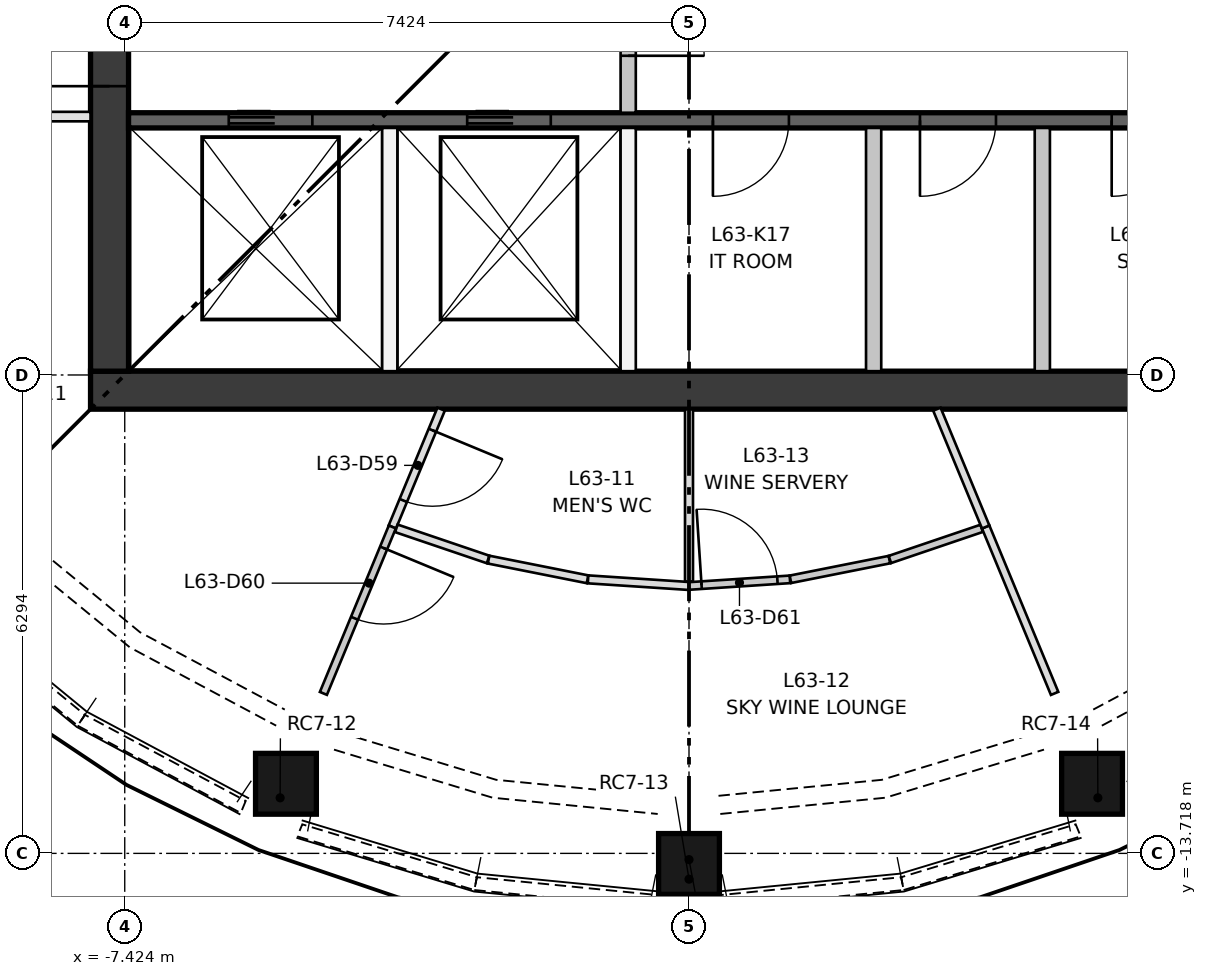
"""IFC4 building model, lengths in metres.
Left out: names, types, materials, properties, quantities, classifications, styles, units other than length and angle.
Written with IfcOpenShell. Run it as: python <this file> out.ifc"""

import sys

from ifc_helpers import new_model, si_unit, direction, frame, frame_2d, origin, origin_2d, place, context, subcontext, project, spatial, polyline, rectangle, outline, extrude, element, fill, save


model = new_model("IFC4")
c1 = context("Model", 3, precision=1e-05, world=origin(), true_north=direction((0.0, 1.0)))
c2 = subcontext(c1, "Body", "Model", "MODEL_VIEW")
j1 = project(units=[si_unit("LENGTHUNIT", "METRE"), si_unit("PLANEANGLEUNIT", "RADIAN")], contexts=[c1])
p1 = place(None, origin())
s1 = spatial("IfcSite", under=j1, at=p1, CompositionType="ELEMENT")
p2 = place(p1, origin())
s2 = spatial("IfcBuilding", under=s1, at=p2, CompositionType="ELEMENT")
p3 = place(p2, frame((0.0, 0.0, 231.2)))
s3 = spatial("IfcBuildingStorey", under=s2, at=p3, CompositionType="ELEMENT", Elevation=231.2)
p4 = place(p3, frame((-5.379, -12.987, 0.5), z_axis=(0.0, 0.0, 1.0), x_axis=(-0.923896423382, 0.382642651649, 0.0)))
e1 = element("IfcColumn", 1, at=p4, inside=s3, PredefinedType="COLUMN", context=c2, shape_type="SweptSolid", body=[
    extrude(rectangle(XDim=0.8, YDim=0.8, at=origin_2d()), origin(), (0.0, -0.275, 0.962), 3.328),
])
p5 = place(p3, frame((0.0, -14.057, 0.5), z_axis=(0.0, 0.0, 1.0), x_axis=(-1.0, 0.0, 0.0)))
e2 = element("IfcColumn", 2, at=p5, inside=s3, PredefinedType="COLUMN", context=c2, shape_type="SweptSolid", body=[
    extrude(rectangle(XDim=0.8, YDim=0.8, at=origin_2d()), origin(), (0.0, -0.275, 0.962), 3.328),
])
p6 = place(p3, frame((5.379, -12.987, 0.5), z_axis=(0.0, 0.0, 1.0), x_axis=(-0.923896423382, -0.382642651649, 0.0)))
e3 = element("IfcColumn", 3, at=p6, inside=s3, PredefinedType="COLUMN", context=c2, shape_type="SweptSolid", body=[
    extrude(rectangle(XDim=0.8, YDim=0.8, at=origin_2d()), origin(), (0.0, -0.275, 0.962), 3.328),
])
p7 = place(p3, frame((-7.874, -7.624, 0.0), z_axis=(0.0, 0.0, 1.0), x_axis=(1.0, 0.0, 0.0)))
e4 = element("IfcWall", 4, at=p7, inside=s3, PredefinedType="SHEAR", context=c2, shape_type="SweptSolid", body=[
    extrude(rectangle(XDim=15.748, YDim=0.5, at=frame_2d((7.874, 0.0))), origin(), (0.0, 0.0, 1.0), 3.3),
])
p8 = place(p3, frame((-7.624, -7.374, 0.0), z_axis=(0.0, 0.0, 1.0), x_axis=(0.0, 1.0, 0.0)))
e5 = element("IfcWall", 5, at=p8, inside=s3, PredefinedType="SHEAR", context=c2, shape_type="SweptSolid", body=[
    extrude(rectangle(XDim=14.748, YDim=0.5, at=frame_2d((7.374, 0.0))), origin(), (0.0, 0.0, 1.0), 3.3),
])
p9 = place(p8, frame((6.874, 0.0, 0.0)))
e6 = element("IfcOpeningElement", 6, at=p9, cuts=e5, PredefinedType="OPENING", context=c2, shape_type="SweptSolid", body=[
    extrude(rectangle(XDim=1.0, YDim=2.1, at=frame_2d((0.5, 1.05))), frame((0.0, 0.26, 0.0), z_axis=(0.0, -1.0, 0.0), x_axis=(1.0, 0.0, 0.0)), (0.0, 0.0, 1.0), 0.52),
])
p10 = place(p8, frame((3.75, 0.0, 0.0)))
e7 = element("IfcOpeningElement", 7, at=p10, cuts=e5, PredefinedType="OPENING", context=c2, shape_type="SweptSolid", body=[
    extrude(rectangle(XDim=1.8, YDim=2.1, at=frame_2d((0.9, 1.05))), frame((0.0, 0.26, 0.0), z_axis=(0.0, -1.0, 0.0), x_axis=(1.0, 0.0, 0.0)), (0.0, 0.0, 1.0), 0.52),
])
p11 = place(p8, frame((9.198, 0.0, 0.0)))
e8 = element("IfcOpeningElement", 8, at=p11, cuts=e5, PredefinedType="OPENING", context=c2, shape_type="SweptSolid", body=[
    extrude(rectangle(XDim=1.8, YDim=2.1, at=frame_2d((0.9, 1.05))), frame((0.0, 0.26, 0.0), z_axis=(0.0, -1.0, 0.0), x_axis=(1.0, 0.0, 0.0)), (0.0, 0.0, 1.0), 0.52),
])
p12 = place(p3, frame((-7.374, -4.074, 0.0), z_axis=(0.0, 0.0, 1.0), x_axis=(1.0, 0.0, 0.0)))
e9 = element("IfcWall", 9, at=p12, inside=s3, PredefinedType="SHEAR", context=c2, shape_type="SweptSolid", body=[
    extrude(rectangle(XDim=14.748, YDim=0.2, at=frame_2d((7.374, 0.0))), origin(), (0.0, 0.0, 1.0), 3.3),
])
p13 = place(p12, frame((1.319, 0.0, 0.0)))
e10 = element("IfcOpeningElement", 10, at=p13, cuts=e9, PredefinedType="OPENING", context=c2, shape_type="SweptSolid", body=[
    extrude(rectangle(XDim=1.1, YDim=2.1, at=frame_2d((0.55, 1.05))), frame((0.0, 0.11, 0.0), z_axis=(0.0, -1.0, 0.0), x_axis=(1.0, 0.0, 0.0)), (0.0, 0.0, 1.0), 0.22),
])
p14 = place(p12, frame((4.456, 0.0, 0.0)))
e11 = element("IfcOpeningElement", 11, at=p14, cuts=e9, PredefinedType="OPENING", context=c2, shape_type="SweptSolid", body=[
    extrude(rectangle(XDim=1.1, YDim=2.1, at=frame_2d((0.55, 1.05))), frame((0.0, 0.11, 0.0), z_axis=(0.0, -1.0, 0.0), x_axis=(1.0, 0.0, 0.0)), (0.0, 0.0, 1.0), 0.22),
])
p15 = place(p12, frame((7.689, 0.0, 0.0)))
e12 = element("IfcOpeningElement", 12, at=p15, cuts=e9, PredefinedType="OPENING", context=c2, shape_type="SweptSolid", body=[
    extrude(rectangle(XDim=1.0, YDim=2.1, at=frame_2d((0.5, 1.05))), frame((0.0, 0.11, 0.0), z_axis=(0.0, -1.0, 0.0), x_axis=(1.0, 0.0, 0.0)), (0.0, 0.0, 1.0), 0.22),
])
p16 = place(p12, frame((10.413, 0.0, 0.0)))
e13 = element("IfcOpeningElement", 13, at=p16, cuts=e9, PredefinedType="OPENING", context=c2, shape_type="SweptSolid", body=[
    extrude(rectangle(XDim=1.0, YDim=2.1, at=frame_2d((0.5, 1.05))), frame((0.0, 0.11, 0.0), z_axis=(0.0, -1.0, 0.0), x_axis=(1.0, 0.0, 0.0)), (0.0, 0.0, 1.0), 0.22),
])
p17 = place(p12, frame((12.935, 0.0, 0.0)))
e14 = element("IfcOpeningElement", 14, at=p17, cuts=e9, PredefinedType="OPENING", context=c2, shape_type="SweptSolid", body=[
    extrude(rectangle(XDim=1.0, YDim=2.1, at=frame_2d((0.5, 1.05))), frame((0.0, 0.11, 0.0), z_axis=(0.0, -1.0, 0.0), x_axis=(1.0, 0.0, 0.0)), (0.0, 0.0, 1.0), 0.22),
])
for number, where, z_axis, x_axis in (
    (15, (-3.937, -7.374, 0.0), (0.0, 0.0, 1.0), (0.0, 1.0, 0.0)),
    (16, (-0.8, -7.374, 0.0), (0.0, 0.0, 1.0), (0.0, 1.0, 0.0)),
):
    element("IfcWall", number, at=place(p3, frame(where, z_axis=z_axis, x_axis=x_axis)), inside=s3, PredefinedType="PARTITIONING", context=c2, shape_type="SweptSolid", body=[
        extrude(rectangle(XDim=3.2, YDim=0.2, at=frame_2d((1.6, 0.0))), origin(), (0.0, 0.0, 1.0), 3.3),
    ])
p18 = place(p3, frame((-0.8, -3.974, 0.0), z_axis=(0.0, 0.0, 1.0), x_axis=(0.0, 1.0, 0.0)))
e17 = element("IfcWall", 17, at=p18, inside=s3, PredefinedType="PARTITIONING", context=c2, shape_type="SweptSolid", body=[
    extrude(rectangle(XDim=2.499, YDim=0.2, at=frame_2d((1.25, 0.0))), origin(), (0.0, 0.0, 1.0), 3.3),
])
p19 = place(p18, frame((0.75, 0.0, 0.0)))
e18 = element("IfcOpeningElement", 18, at=p19, cuts=e17, PredefinedType="OPENING", context=c2, shape_type="SweptSolid", body=[
    extrude(rectangle(XDim=1.0, YDim=2.1, at=frame_2d((0.5, 1.05))), frame((0.0, 0.11, 0.0), z_axis=(0.0, -1.0, 0.0), x_axis=(1.0, 0.0, 0.0)), (0.0, 0.0, 1.0), 0.22),
])
for number, where, z_axis, x_axis in (
    (19, (2.429, -7.374, 0.0), (0.0, 0.0, 1.0), (0.0, 1.0, 0.0)),
    (20, (4.649, -7.374, 0.0), (0.0, 0.0, 1.0), (0.0, 1.0, 0.0)),
):
    element("IfcWall", number, at=place(p3, frame(where, z_axis=z_axis, x_axis=x_axis)), inside=s3, PredefinedType="PARTITIONING", context=c2, shape_type="SweptSolid", body=[
        extrude(rectangle(XDim=3.2, YDim=0.2, at=frame_2d((1.6, 0.0))), origin(), (0.0, 0.0, 1.0), 3.3),
    ])
p20 = place(p3, frame((-9.926, -10.495, 0.0), z_axis=(-0.59284076781, -0.722862546463, 0.354978257002), x_axis=(0.773221096766, -0.634136527431, 9.701072e-06)))
e21 = element("IfcWall", 21, at=p20, inside=s3, PredefinedType="SOLIDWALL", context=c2, shape_type="SweptSolid", body=[
    extrude(outline(polyline([(0.0, 0.0), (2.434, -5.551e-17), (2.417, 0.481), (0.017, 0.481), (0.0, 0.0)])), origin(), (0.0, 0.0, -1.0), 0.3),
])
p21 = place(p3, frame((-8.044, -12.038, 0.0), z_axis=(-0.441126603603, -0.824402860411, 0.354636776631), x_axis=(0.881712517728, -0.471787066311, 1.195964e-05)))
e22 = element("IfcWall", 22, at=p21, inside=s3, PredefinedType="SOLIDWALL", context=c2, shape_type="SweptSolid", body=[
    extrude(outline(polyline([(0.0, 0.0), (2.434, 5.551e-17), (2.417, 0.481), (0.017, 0.481), (0.0, 0.0)])), origin(), (0.0, 0.0, -1.0), 0.3),
])
p22 = place(p3, frame((-5.154, -13.494, 0.0), z_axis=(-0.271094631402, -0.894631168658, 0.355165838574), x_axis=(0.957026634075, -0.290000037325, 4.815507e-06)))
e23 = element("IfcWall", 23, at=p22, inside=s3, PredefinedType="SOLIDWALL", context=c2, shape_type="SweptSolid", body=[
    extrude(outline(polyline([(0.0, 0.0), (2.434, 0.0), (2.417, 0.481), (0.017, 0.481), (0.0, 0.0)])), origin(), (0.0, 0.0, -1.0), 0.3),
])
p23 = place(p3, frame((-2.824, -14.2, 0.0), z_axis=(-0.091755306795, -0.93035064291, 0.355005133642), x_axis=(0.995172119915, -0.098145054237, 8.475565e-06)))
e24 = element("IfcWall", 24, at=p23, inside=s3, PredefinedType="SOLIDWALL", context=c2, shape_type="SweptSolid", body=[
    extrude(outline(polyline([(0.0, 0.0), (2.433, 1.388e-17), (2.417, 0.481), (0.017, 0.481), (0.0, 0.0)])), origin(), (0.0, 0.0, -1.0), 0.3),
])
p24 = place(p3, frame((0.403, -14.439, 0.0), z_axis=(0.091755306795, -0.93035064291, 0.355005133642), x_axis=(0.995172119915, 0.098145054237, -8.475565e-06)))
e25 = element("IfcWall", 25, at=p24, inside=s3, PredefinedType="SOLIDWALL", context=c2, shape_type="SweptSolid", body=[
    extrude(outline(polyline([(0.0, 0.0), (2.433, -1.388e-17), (2.417, 0.481), (0.017, 0.481), (0.0, 0.0)])), origin(), (0.0, 0.0, -1.0), 0.3),
])
p25 = place(p3, frame((2.824, -14.2, 0.0), z_axis=(0.271074750296, -0.894721380135, 0.354953703573), x_axis=(0.957038883806, 0.289959608839, 1.1226683e-05)))
e26 = element("IfcWall", 26, at=p25, inside=s3, PredefinedType="SOLIDWALL", context=c2, shape_type="SweptSolid", body=[
    extrude(outline(polyline([(0.0, 0.0), (2.434, -5.551e-17), (2.417, 0.481), (0.017, 0.481), (0.0, 0.0)])), origin(), (0.0, 0.0, -1.0), 0.3),
])
p26 = place(p3, frame((5.898, -13.186, 0.0), z_axis=(0.441016524886, -0.824332600798, 0.35493687895), x_axis=(0.881740708382, 0.471734377661, 1.0715603e-05)))
e27 = element("IfcWall", 27, at=p26, inside=s3, PredefinedType="SOLIDWALL", context=c2, shape_type="SweptSolid", body=[
    extrude(outline(polyline([(0.0, 0.0), (2.434, 0.0), (2.417, 0.481), (0.017, 0.481), (0.0, 0.0)])), origin(), (0.0, 0.0, -1.0), 0.3),
])
p27 = place(p3, frame((-7.874, -4.024, 0.0), z_axis=(0.0, 0.0, 1.0), x_axis=(-1.0, 0.0, 0.0)))
e28 = element("IfcWall", 28, at=p27, inside=s3, PredefinedType="PARTITIONING", context=c2, shape_type="SweptSolid", body=[
    extrude(rectangle(XDim=1.109, YDim=0.125, at=frame_2d((0.554, 0.0))), origin(), (0.0, 0.0, 1.0), 3.3),
])
p28 = place(p3, frame((-3.261, -7.874, 0.0), z_axis=(0.0, 0.0, 1.0), x_axis=(-0.382681757498, -0.923880226262, 0.0)))
e29 = element("IfcWall", 29, at=p28, inside=s3, PredefinedType="PARTITIONING", context=c2, shape_type="SweptSolid", body=[
    extrude(rectangle(XDim=1.677, YDim=0.105, at=frame_2d((0.839, 0.0))), origin(), (0.0, 0.0, 1.0), 3.3),
])
p29 = place(p28, frame((0.3, 0.0, 0.0)))
e30 = element("IfcOpeningElement", 30, at=p29, cuts=e29, PredefinedType="OPENING", context=c2, shape_type="SweptSolid", body=[
    extrude(rectangle(XDim=1.0, YDim=2.1, at=frame_2d((0.5, 1.05))), frame((0.0, 0.062, 0.0), z_axis=(0.0, -1.0, 0.0), x_axis=(1.0, 0.0, 0.0)), (0.0, 0.0, 1.0), 0.125),
])
p30 = place(p3, frame((-3.903, -9.424, 0.0), z_axis=(0.0, 0.0, 1.0), x_axis=(-0.382676271808, -0.923882498479, 0.0)))
e31 = element("IfcWall", 31, at=p30, inside=s3, PredefinedType="PARTITIONING", context=c2, shape_type="SweptSolid", body=[
    extrude(rectangle(XDim=2.37, YDim=0.1, at=frame_2d((1.185, 0.0))), origin(), (0.0, 0.0, 1.0), 3.3),
])
p31 = place(p30, frame((0.3, 0.0, 0.0)))
e32 = element("IfcOpeningElement", 32, at=p31, cuts=e31, PredefinedType="OPENING", context=c2, shape_type="SweptSolid", body=[
    extrude(rectangle(XDim=1.0, YDim=2.1, at=frame_2d((0.5, 1.05))), frame((0.0, 0.06, 0.0), z_axis=(0.0, -1.0, 0.0), x_axis=(1.0, 0.0, 0.0)), (0.0, 0.0, 1.0), 0.12),
])
p32 = place(p3, frame((-2.643, -9.851, 0.0), z_axis=(0.0, 0.0, 1.0), x_axis=(-0.946945394448, 0.321394492695, 0.0)))
e33 = element("IfcWall", 33, at=p32, inside=s3, PredefinedType="PARTITIONING", context=c2, shape_type="SweptSolid", body=[
    extrude(rectangle(XDim=1.275, YDim=0.105, at=frame_2d((0.637, 0.0))), origin(), (0.0, 0.0, 1.0), 3.3),
])
p33 = place(p3, frame((-1.335, -10.112, 0.0), z_axis=(0.0, 0.0, 1.0), x_axis=(-0.980778229799, 0.195125764451, 0.0)))
e34 = element("IfcWall", 34, at=p33, inside=s3, PredefinedType="PARTITIONING", context=c2, shape_type="SweptSolid", body=[
    extrude(rectangle(XDim=1.328, YDim=0.105, at=frame_2d((0.664, 0.0))), origin(), (0.0, 0.0, 1.0), 3.3),
])
p34 = place(p3, frame((0.0, -10.2, 0.0), z_axis=(0.0, 0.0, 1.0), x_axis=(-0.997852823211, 0.065496131253, 0.0)))
e35 = element("IfcWall", 35, at=p34, inside=s3, PredefinedType="PARTITIONING", context=c2, shape_type="SweptSolid", body=[
    extrude(rectangle(XDim=1.331, YDim=0.105, at=frame_2d((0.666, 0.0))), origin(), (0.0, 0.0, 1.0), 3.3),
])
p35 = place(p3, frame((0.0, -7.874, 0.0), z_axis=(0.0, 0.0, 1.0), x_axis=(0.0, -1.0, 0.0)))
e36 = element("IfcWall", 36, at=p35, inside=s3, PredefinedType="PARTITIONING", context=c2, shape_type="SweptSolid", body=[
    extrude(rectangle(XDim=2.27, YDim=0.105, at=frame_2d((1.135, 0.0))), origin(), (0.0, 0.0, 1.0), 3.3),
])
p36 = place(p3, frame((0.0, -10.2, 0.0), z_axis=(0.0, 0.0, 1.0), x_axis=(0.997853610003, 0.065484143156, 0.0)))
e37 = element("IfcWall", 37, at=p36, inside=s3, PredefinedType="PARTITIONING", context=c2, shape_type="SweptSolid", body=[
    extrude(rectangle(XDim=1.331, YDim=0.1, at=frame_2d((0.666, 0.0))), origin(), (0.0, 0.0, 1.0), 3.3),
])
p37 = place(p36, frame((0.166, 0.0, 0.0)))
e38 = element("IfcOpeningElement", 38, at=p37, cuts=e37, PredefinedType="OPENING", context=c2, shape_type="SweptSolid", body=[
    extrude(rectangle(XDim=1.0, YDim=2.1, at=frame_2d((0.5, 1.05))), frame((0.0, 0.06, 0.0), z_axis=(0.0, -1.0, 0.0), x_axis=(1.0, 0.0, 0.0)), (0.0, 0.0, 1.0), 0.12),
])
p38 = place(p3, frame((1.335, -10.112, 0.0), z_axis=(0.0, 0.0, 1.0), x_axis=(0.980778229799, 0.195125764451, 0.0)))
e39 = element("IfcWall", 39, at=p38, inside=s3, PredefinedType="PARTITIONING", context=c2, shape_type="SweptSolid", body=[
    extrude(rectangle(XDim=1.328, YDim=0.1, at=frame_2d((0.664, 0.0))), origin(), (0.0, 0.0, 1.0), 3.3),
])
p39 = place(p3, frame((2.643, -9.851, 0.0), z_axis=(0.0, 0.0, 1.0), x_axis=(0.946984941769, 0.321277948299, 0.0)))
e40 = element("IfcWall", 40, at=p39, inside=s3, PredefinedType="PARTITIONING", context=c2, shape_type="SweptSolid", body=[
    extrude(rectangle(XDim=1.275, YDim=0.1, at=frame_2d((0.638, 0.0))), origin(), (0.0, 0.0, 1.0), 3.3),
])
p40 = place(p3, frame((3.903, -9.424, 0.0), z_axis=(0.0, 0.0, 1.0), x_axis=(0.382676271808, -0.923882498479, 0.0)))
e41 = element("IfcWall", 41, at=p40, inside=s3, PredefinedType="PARTITIONING", context=c2, shape_type="SweptSolid", body=[
    extrude(rectangle(XDim=2.37, YDim=0.105, at=frame_2d((1.185, 0.0))), origin(), (0.0, 0.0, 1.0), 3.3),
])
p41 = place(p3, frame((3.261, -7.874, 0.0), z_axis=(0.0, 0.0, 1.0), x_axis=(0.382681757498, -0.923880226262, 0.0)))
e42 = element("IfcWall", 42, at=p41, inside=s3, PredefinedType="PARTITIONING", context=c2, shape_type="SweptSolid", body=[
    extrude(rectangle(XDim=1.677, YDim=0.105, at=frame_2d((0.839, 0.0))), origin(), (0.0, 0.0, 1.0), 3.3),
])
p42 = place(p13, origin())
e43 = element("IfcDoor", 43, at=p42, inside=s3, OperationType="DOUBLE_DOOR_SLIDING", PredefinedType="DOOR", context=c2, shape_type="SweptSolid", body=[
    extrude(rectangle(XDim=1.1, YDim=2.1, at=frame_2d((0.55, 1.05))), frame((0.0, 0.025, 0.0), z_axis=(0.0, -1.0, 0.0), x_axis=(1.0, 0.0, 0.0)), (0.0, 0.0, 1.0), 0.05),
])
fill(e10, e43)
p43 = place(p14, origin())
e44 = element("IfcDoor", 44, at=p43, inside=s3, OperationType="DOUBLE_DOOR_SLIDING", PredefinedType="DOOR", context=c2, shape_type="SweptSolid", body=[
    extrude(rectangle(XDim=1.1, YDim=2.1, at=frame_2d((0.55, 1.05))), frame((0.0, 0.025, 0.0), z_axis=(0.0, -1.0, 0.0), x_axis=(1.0, 0.0, 0.0)), (0.0, 0.0, 1.0), 0.05),
])
fill(e11, e44)
p44 = place(p19, frame((1.0, 0.0, 0.0), z_axis=(0.0, 0.0, 1.0), x_axis=(-1.0, 0.0, 0.0)))
e45 = element("IfcDoor", 45, at=p44, inside=s3, OperationType="SINGLE_SWING_LEFT", PredefinedType="DOOR", context=c2, shape_type="SweptSolid", body=[
    extrude(rectangle(XDim=1.0, YDim=2.1, at=frame_2d((0.5, 1.05))), frame((0.0, 0.025, 0.0), z_axis=(0.0, -1.0, 0.0), x_axis=(1.0, 0.0, 0.0)), (0.0, 0.0, 1.0), 0.05),
])
fill(e18, e45)
p45 = place(p15, frame((1.0, 0.0, 0.0), z_axis=(0.0, 0.0, 1.0), x_axis=(-1.0, 0.0, 0.0)))
e46 = element("IfcDoor", 46, at=p45, inside=s3, OperationType="SINGLE_SWING_LEFT", PredefinedType="DOOR", context=c2, shape_type="SweptSolid", body=[
    extrude(rectangle(XDim=1.0, YDim=2.1, at=frame_2d((0.5, 1.05))), frame((0.0, 0.025, 0.0), z_axis=(0.0, -1.0, 0.0), x_axis=(1.0, 0.0, 0.0)), (0.0, 0.0, 1.0), 0.05),
])
fill(e12, e46)
p46 = place(p16, frame((1.0, 0.0, 0.0), z_axis=(0.0, 0.0, 1.0), x_axis=(-1.0, 0.0, 0.0)))
e47 = element("IfcDoor", 47, at=p46, inside=s3, OperationType="SINGLE_SWING_LEFT", PredefinedType="DOOR", context=c2, shape_type="SweptSolid", body=[
    extrude(rectangle(XDim=1.0, YDim=2.1, at=frame_2d((0.5, 1.05))), frame((0.0, 0.025, 0.0), z_axis=(0.0, -1.0, 0.0), x_axis=(1.0, 0.0, 0.0)), (0.0, 0.0, 1.0), 0.05),
])
fill(e13, e47)
p47 = place(p17, frame((1.0, 0.0, 0.0), z_axis=(0.0, 0.0, 1.0), x_axis=(-1.0, 0.0, 0.0)))
e48 = element("IfcDoor", 48, at=p47, inside=s3, OperationType="SINGLE_SWING_LEFT", PredefinedType="DOOR", context=c2, shape_type="SweptSolid", body=[
    extrude(rectangle(XDim=1.0, YDim=2.1, at=frame_2d((0.5, 1.05))), frame((0.0, 0.025, 0.0), z_axis=(0.0, -1.0, 0.0), x_axis=(1.0, 0.0, 0.0)), (0.0, 0.0, 1.0), 0.05),
])
fill(e14, e48)
p48 = place(p10, origin())
e49 = element("IfcDoor", 49, at=p48, inside=s3, OperationType="DOUBLE_DOOR_SINGLE_SWING", PredefinedType="DOOR", context=c2, shape_type="SweptSolid", body=[
    extrude(rectangle(XDim=1.8, YDim=2.1, at=frame_2d((0.9, 1.05))), frame((0.0, 0.025, 0.0), z_axis=(0.0, -1.0, 0.0), x_axis=(1.0, 0.0, 0.0)), (0.0, 0.0, 1.0), 0.05),
])
fill(e7, e49)
p49 = place(p29, origin())
e50 = element("IfcDoor", 50, at=p49, inside=s3, OperationType="SINGLE_SWING_LEFT", PredefinedType="DOOR", context=c2, shape_type="SweptSolid", body=[
    extrude(rectangle(XDim=1.0, YDim=2.1, at=frame_2d((0.5, 1.05))), frame((0.0, 0.025, 0.0), z_axis=(0.0, -1.0, 0.0), x_axis=(1.0, 0.0, 0.0)), (0.0, 0.0, 1.0), 0.05),
])
fill(e30, e50)
p50 = place(p31, origin())
e51 = element("IfcDoor", 51, at=p50, inside=s3, OperationType="SINGLE_SWING_LEFT", PredefinedType="DOOR", context=c2, shape_type="SweptSolid", body=[
    extrude(rectangle(XDim=1.0, YDim=2.1, at=frame_2d((0.5, 1.05))), frame((0.0, 0.025, 0.0), z_axis=(0.0, -1.0, 0.0), x_axis=(1.0, 0.0, 0.0)), (0.0, 0.0, 1.0), 0.05),
])
fill(e32, e51)
p51 = place(p37, origin())
e52 = element("IfcDoor", 52, at=p51, inside=s3, OperationType="SINGLE_SWING_LEFT", PredefinedType="DOOR", context=c2, shape_type="SweptSolid", body=[
    extrude(rectangle(XDim=1.0, YDim=2.1, at=frame_2d((0.5, 1.05))), frame((0.0, 0.025, 0.0), z_axis=(0.0, -1.0, 0.0), x_axis=(1.0, 0.0, 0.0)), (0.0, 0.0, 1.0), 0.05),
])
fill(e38, e52)
save(model, sys.argv[1])
